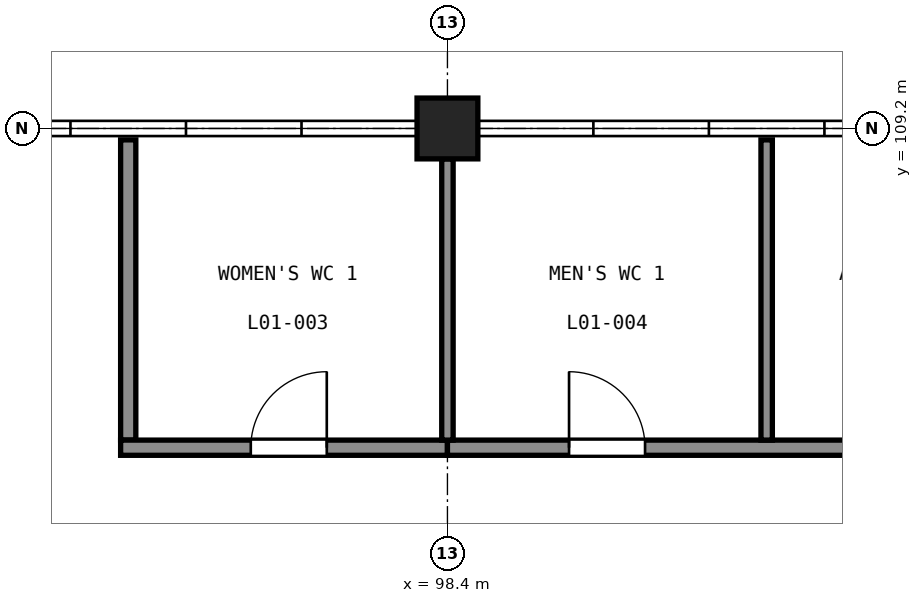
"""IFC4 building model, lengths in metres.
Left out: names, types, materials, properties, quantities, classifications, styles, units other than length and angle.
Written with IfcOpenShell. Run it as: python <this file> out.ifc"""

import sys

from ifc_helpers import new_model, si_unit, direction, frame, frame_2d, origin, origin_2d, place, context, subcontext, project, spatial, rectangle, extrude, element, fill, save


model = new_model("IFC4")
c1 = context("Model", 3, precision=1e-05, world=origin(), true_north=direction((0.0, 1.0)))
c2 = subcontext(c1, "Body", "Model", "MODEL_VIEW")
j1 = project(units=[si_unit("LENGTHUNIT", "METRE"), si_unit("PLANEANGLEUNIT", "RADIAN")], contexts=[c1])
p1 = place(None, origin())
s1 = spatial("IfcSite", under=j1, at=p1, CompositionType="ELEMENT")
p2 = place(p1, origin())
s2 = spatial("IfcBuilding", under=s1, at=p2, CompositionType="ELEMENT")
p3 = place(p2, frame((0.0, 0.0, 5.5)))
s3 = spatial("IfcBuildingStorey", under=s2, at=p3, CompositionType="ELEMENT", Elevation=5.5)
p4 = place(p3, frame((98.4, 109.2, 0.0), z_axis=(0.0, 0.0, 1.0), x_axis=(1.0, 0.0, 0.0)))
e1 = element("IfcColumn", 1, at=p4, inside=s3, PredefinedType="COLUMN", context=c2, shape_type="SweptSolid", body=[
    extrude(rectangle(XDim=0.8, YDim=0.8, at=origin_2d()), origin(), (0.0, 0.0, 1.0), 5.0),
])
p5 = place(p3, frame((94.2, 105.1, 0.0), z_axis=(0.0, 0.0, 1.0), x_axis=(0.0, 1.0, 0.0)))
e2 = element("IfcWall", 2, at=p5, inside=s3, PredefinedType="PARTITIONING", context=c2, shape_type="SweptSolid", body=[
    extrude(rectangle(XDim=3.95, YDim=0.2, at=frame_2d((1.975, 0.0))), origin(), (0.0, 0.0, 1.0), 3.9),
])
p6 = place(p3, frame((94.1, 105.0, 0.0), z_axis=(0.0, 0.0, 1.0), x_axis=(1.0, 0.0, 0.0)))
e3 = element("IfcWall", 3, at=p6, inside=s3, PredefinedType="PARTITIONING", context=c2, shape_type="SweptSolid", body=[
    extrude(rectangle(XDim=4.3, YDim=0.2, at=frame_2d((2.15, 0.0))), origin(), (0.0, 0.0, 1.0), 3.9),
])
p7 = place(p6, frame((1.712, 0.0, 0.0)))
e4 = element("IfcOpeningElement", 4, at=p7, cuts=e3, PredefinedType="OPENING", context=c2, shape_type="SweptSolid", body=[
    extrude(rectangle(XDim=1.0, YDim=2.1, at=frame_2d((0.5, 1.05))), frame((0.0, 0.11, 0.0), z_axis=(0.0, -1.0, 0.0), x_axis=(1.0, 0.0, 0.0)), (0.0, 0.0, 1.0), 0.22),
])
p8 = place(p3, frame((98.4, 105.0, 0.0), z_axis=(0.0, 0.0, 1.0), x_axis=(1.0, 0.0, 0.0)))
e5 = element("IfcWall", 5, at=p8, inside=s3, PredefinedType="PARTITIONING", context=c2, shape_type="SweptSolid", body=[
    extrude(rectangle(XDim=8.5, YDim=0.2, at=frame_2d((4.25, 0.0))), origin(), (0.0, 0.0, 1.0), 3.9),
])
p9 = place(p8, frame((1.6, 0.0, 0.0)))
e6 = element("IfcOpeningElement", 6, at=p9, cuts=e5, PredefinedType="OPENING", context=c2, shape_type="SweptSolid", body=[
    extrude(rectangle(XDim=1.0, YDim=2.1, at=frame_2d((0.5, 1.05))), frame((0.0, 0.11, 0.0), z_axis=(0.0, -1.0, 0.0), x_axis=(1.0, 0.0, 0.0)), (0.0, 0.0, 1.0), 0.22),
])
p10 = place(p8, frame((5.788, 0.0, 0.0)))
e7 = element("IfcOpeningElement", 7, at=p10, cuts=e5, PredefinedType="OPENING", context=c2, shape_type="SweptSolid", body=[
    extrude(rectangle(XDim=1.0, YDim=2.1, at=frame_2d((0.5, 1.05))), frame((0.0, 0.11, 0.0), z_axis=(0.0, -1.0, 0.0), x_axis=(1.0, 0.0, 0.0)), (0.0, 0.0, 1.0), 0.22),
])
p11 = place(p3, frame((98.4, 105.1, 0.0), z_axis=(0.0, 0.0, 1.0), x_axis=(0.0, 1.0, 0.0)))
e8 = element("IfcWall", 8, at=p11, inside=s3, PredefinedType="PARTITIONING", context=c2, shape_type="SweptSolid", body=[
    extrude(rectangle(XDim=3.7, YDim=0.15, at=frame_2d((1.85, 0.0))), origin(), (0.0, 0.0, 1.0), 3.9),
])
p12 = place(p3, frame((102.6, 105.1, 0.0), z_axis=(0.0, 0.0, 1.0), x_axis=(0.0, 1.0, 0.0)))
e9 = element("IfcWall", 9, at=p12, inside=s3, PredefinedType="PARTITIONING", context=c2, shape_type="SweptSolid", body=[
    extrude(rectangle(XDim=3.95, YDim=0.15, at=frame_2d((1.975, 0.0))), origin(), (0.0, 0.0, 1.0), 3.9),
])
p13 = place(p7, origin())
e10 = element("IfcDoor", 10, at=p13, inside=s3, OperationType="SINGLE_SWING_LEFT", PredefinedType="DOOR", context=c2, shape_type="SweptSolid", body=[
    extrude(rectangle(XDim=1.0, YDim=2.1, at=frame_2d((0.5, 1.05))), frame((0.0, 0.025, 0.0), z_axis=(0.0, -1.0, 0.0), x_axis=(1.0, 0.0, 0.0)), (0.0, 0.0, 1.0), 0.05),
])
fill(e4, e10)
p14 = place(p9, origin())
e11 = element("IfcDoor", 11, at=p14, inside=s3, OperationType="SINGLE_SWING_RIGHT", PredefinedType="DOOR", context=c2, shape_type="SweptSolid", body=[
    extrude(rectangle(XDim=1.0, YDim=2.1, at=frame_2d((0.5, 1.05))), frame((0.0, 0.025, 0.0), z_axis=(0.0, -1.0, 0.0), x_axis=(1.0, 0.0, 0.0)), (0.0, 0.0, 1.0), 0.05),
])
fill(e6, e11)
save(model, sys.argv[1])
